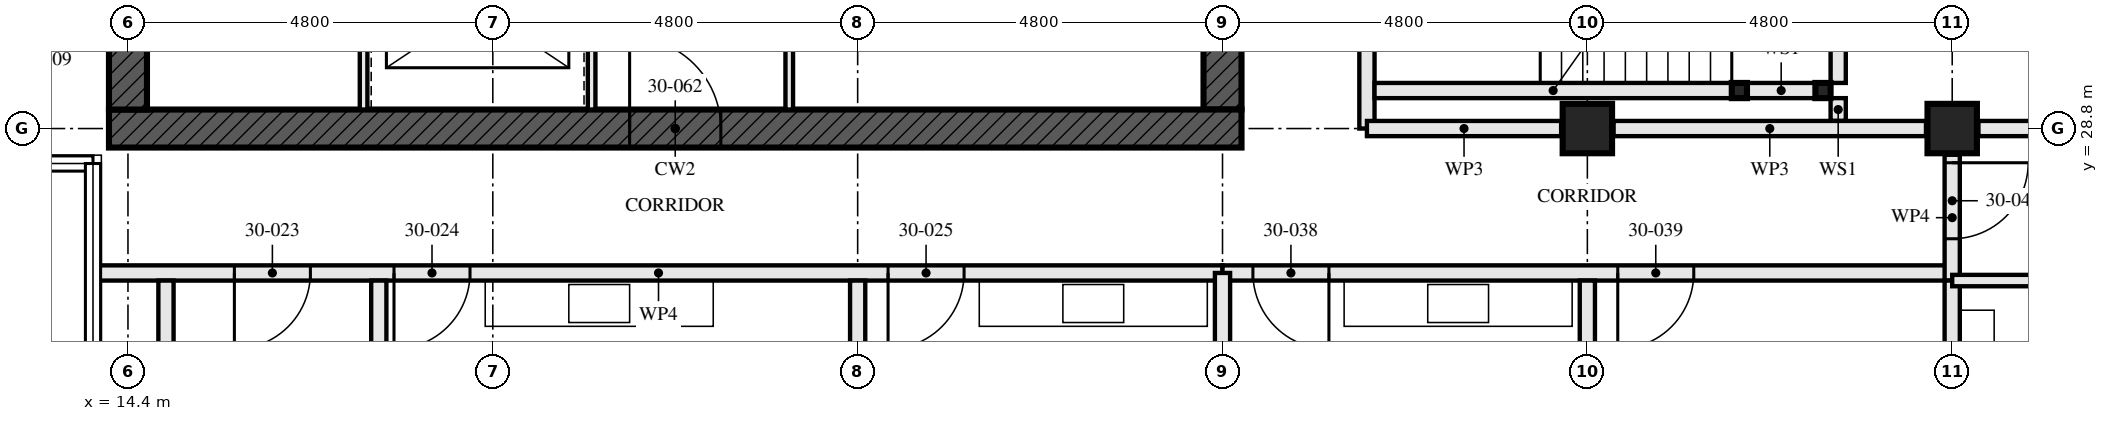
"""IFC4 building model, lengths in metres.
Left out: names, types, materials, properties, quantities, classifications, styles, units other than length and angle.
Written with IfcOpenShell. Run it as: python <this file> out.ifc"""

import sys

from ifc_helpers import new_model, si_unit, direction, frame, frame_2d, origin, origin_2d, place, context, subcontext, project, spatial, rectangle, hollow_rectangle, extrude, element, fill, save


model = new_model("IFC4")
c1 = context("Model", 3, precision=1e-05, world=origin(), true_north=direction((0.0, 1.0)))
c2 = subcontext(c1, "Body", "Model", "MODEL_VIEW")
j1 = project(units=[si_unit("LENGTHUNIT", "METRE"), si_unit("PLANEANGLEUNIT", "RADIAN")], contexts=[c1])
p1 = place(None, origin())
s1 = spatial("IfcSite", under=j1, at=p1, CompositionType="ELEMENT")
p2 = place(p1, origin())
s2 = spatial("IfcBuilding", under=s1, at=p2, CompositionType="ELEMENT")
p3 = place(p2, frame((0.0, 0.0, 112.0)))
s3 = spatial("IfcBuildingStorey", under=s2, at=p3, CompositionType="ELEMENT", Elevation=112.0)
for number, where, z_axis, x_axis in (
    (1, (33.6, 28.8, 0.0), (0.0, 0.0, 1.0), (0.0, 1.0, 0.0)),
    (2, (38.4, 28.8, 0.0), (0.0, 0.0, 1.0), (0.0, 1.0, 0.0)),
):
    element("IfcColumn", number, at=place(p3, frame(where, z_axis=z_axis, x_axis=x_axis)), inside=s3, PredefinedType="COLUMN", context=c2, shape_type="SweptSolid", body=[
        extrude(hollow_rectangle(XDim=0.65, YDim=0.65, WallThickness=0.05, at=origin_2d()), origin(), (0.0, 0.0, 1.0), 3.5),
    ])
p4 = place(p3, frame((14.15, 28.8, -0.17), z_axis=(0.0, 0.0, 1.0), x_axis=(1.0, 0.0, 0.0)))
e3 = element("IfcWall", 3, at=p4, inside=s3, PredefinedType="SHEAR", context=c2, shape_type="SweptSolid", body=[
    extrude(rectangle(XDim=14.9, YDim=0.5, at=frame_2d((7.45, 0.0))), origin(), (0.0, 0.0, 1.0), 3.5),
])
p5 = place(p4, frame((6.85, 0.0, 0.17)))
e4 = element("IfcOpeningElement", 4, at=p5, cuts=e3, PredefinedType="OPENING", context=c2, shape_type="SweptSolid", body=[
    extrude(rectangle(XDim=1.2, YDim=2.1, at=frame_2d((0.6, 1.05))), frame((0.0, 0.26, 0.0), z_axis=(0.0, -1.0, 0.0), x_axis=(1.0, 0.0, 0.0)), (0.0, 0.0, 1.0), 0.521),
])
p6 = place(p3, frame((14.4, 42.95, -0.17), z_axis=(0.0, 0.0, 1.0), x_axis=(0.0, -1.0, 0.0)))
e5 = element("IfcWall", 5, at=p6, inside=s3, PredefinedType="SHEAR", context=c2, shape_type="SweptSolid", body=[
    extrude(rectangle(XDim=13.9, YDim=0.5, at=frame_2d((6.95, 0.0))), origin(), (0.0, 0.0, 1.0), 3.5),
])
p7 = place(p6, frame((6.35, 0.0, 0.17)))
e6 = element("IfcOpeningElement", 6, at=p7, cuts=e5, PredefinedType="OPENING", context=c2, shape_type="SweptSolid", body=[
    extrude(rectangle(XDim=1.2, YDim=2.1, at=frame_2d((0.6, 1.05))), frame((0.0, 0.26, 0.0), z_axis=(0.0, -1.0, 0.0), x_axis=(1.0, 0.0, 0.0)), (0.0, 0.0, 1.0), 0.521),
])
p8 = place(p3, frame((28.8, 29.05, -0.17), z_axis=(0.0, 0.0, 1.0), x_axis=(0.0, 1.0, 0.0)))
e7 = element("IfcWall", 7, at=p8, inside=s3, PredefinedType="SHEAR", context=c2, shape_type="SweptSolid", body=[
    extrude(rectangle(XDim=13.9, YDim=0.5, at=frame_2d((6.95, 0.0))), origin(), (0.0, 0.0, 1.0), 3.5),
])
p9 = place(p8, frame((6.35, 0.0, 0.17)))
e8 = element("IfcOpeningElement", 8, at=p9, cuts=e7, PredefinedType="OPENING", context=c2, shape_type="SweptSolid", body=[
    extrude(rectangle(XDim=1.2, YDim=2.1, at=frame_2d((0.6, 1.05))), frame((0.0, 0.26, 0.0), z_axis=(0.0, -1.0, 0.0), x_axis=(1.0, 0.0, 0.0)), (0.0, 0.0, 1.0), 0.521),
])
for number, where, z_axis, x_axis in (
    (9, (36.7, 29.3, 0.0), (0.0, 0.0, 1.0), (1.0, 0.0, 0.0)),
    (10, (35.6, 29.3, 0.0), (0.0, 0.0, 1.0), (1.0, 0.0, 0.0)),
):
    element("IfcColumn", number, at=place(p3, frame(where, z_axis=z_axis, x_axis=x_axis)), inside=s3, PredefinedType="COLUMN", context=c2, shape_type="SweptSolid", body=[
        extrude(hollow_rectangle(XDim=0.2, YDim=0.2, WallThickness=0.008, at=origin_2d()), origin(), (0.0, 0.0, 1.0), 3.33),
    ])
for number, where, z_axis, x_axis in (
    (11, (14.9, 22.1, 0.0), (0.0, 0.0, 1.0), (0.0, 1.0, 0.0)),
    (12, (17.7, 22.1, 0.0), (0.0, 0.0, 1.0), (0.0, 1.0, 0.0)),
):
    element("IfcWall", number, at=place(p3, frame(where, z_axis=z_axis, x_axis=x_axis)), inside=s3, PredefinedType="SOLIDWALL", context=c2, shape_type="SweptSolid", body=[
        extrude(rectangle(XDim=4.7, YDim=0.2, at=frame_2d((2.35, 0.0))), origin(), (0.0, 0.0, 1.0), 2.99),
    ])
p10 = place(p3, frame((24.0, 14.72, 0.0), z_axis=(0.0, 0.0, 1.0), x_axis=(0.0, 1.0, 0.0)))
e13 = element("IfcWall", 13, at=p10, inside=s3, PredefinedType="PARTITIONING", context=c2, shape_type="SweptSolid", body=[
    extrude(rectangle(XDim=12.08, YDim=0.2, at=frame_2d((6.04, 0.0))), origin(), (0.0, 0.0, 1.0), 2.55),
])
p11 = place(p3, frame((13.96, 26.9, 0.0), z_axis=(0.0, 0.0, 1.0), x_axis=(1.0, 0.0, 0.0)))
e14 = element("IfcWall", 14, at=p11, inside=s3, PredefinedType="PARTITIONING", context=c2, shape_type="SweptSolid", body=[
    extrude(rectangle(XDim=14.84, YDim=0.2, at=frame_2d((7.42, 0.0))), origin(), (0.0, 0.0, 1.0), 2.32),
])
p12 = place(p11, frame((1.84, 0.0, 0.0)))
e15 = element("IfcOpeningElement", 15, at=p12, cuts=e14, PredefinedType="OPENING", context=c2, shape_type="SweptSolid", body=[
    extrude(rectangle(XDim=1.0, YDim=2.1, at=frame_2d((0.5, 1.05))), frame((0.0, 0.111, 0.0), z_axis=(0.0, -1.0, 0.0), x_axis=(1.0, 0.0, 0.0)), (0.0, 0.0, 1.0), 0.221),
])
p13 = place(p11, frame((3.94, 0.0, 0.0)))
e16 = element("IfcOpeningElement", 16, at=p13, cuts=e14, PredefinedType="OPENING", context=c2, shape_type="SweptSolid", body=[
    extrude(rectangle(XDim=1.0, YDim=2.1, at=frame_2d((0.5, 1.05))), frame((0.0, 0.111, 0.0), z_axis=(0.0, -1.0, 0.0), x_axis=(1.0, 0.0, 0.0)), (0.0, 0.0, 1.0), 0.221),
])
p14 = place(p11, frame((10.44, 0.0, 0.0)))
e17 = element("IfcOpeningElement", 17, at=p14, cuts=e14, PredefinedType="OPENING", context=c2, shape_type="SweptSolid", body=[
    extrude(rectangle(XDim=1.0, YDim=2.1, at=frame_2d((0.5, 1.05))), frame((0.0, 0.111, 0.0), z_axis=(0.0, -1.0, 0.0), x_axis=(1.0, 0.0, 0.0)), (0.0, 0.0, 1.0), 0.221),
])
p15 = place(p3, frame((33.6, 14.644, 0.0), z_axis=(0.0, 0.0, 1.0), x_axis=(0.0, 1.0, 0.0)))
e18 = element("IfcWall", 18, at=p15, inside=s3, PredefinedType="PARTITIONING", context=c2, shape_type="SweptSolid", body=[
    extrude(rectangle(XDim=12.156, YDim=0.2, at=frame_2d((6.078, 0.0))), origin(), (0.0, 0.0, 1.0), 2.55),
])
p16 = place(p3, frame((38.4, 19.52, 0.0), z_axis=(0.0, 0.0, 1.0), x_axis=(0.0, 1.0, 0.0)))
e19 = element("IfcWall", 19, at=p16, inside=s3, PredefinedType="PARTITIONING", context=c2, shape_type="SweptSolid", body=[
    extrude(rectangle(XDim=7.28, YDim=0.2, at=frame_2d((3.64, 0.0))), origin(), (0.0, 0.0, 1.0), 2.55),
])
p17 = place(p3, frame((38.4, 26.8, 0.0), z_axis=(0.0, 0.0, 1.0), x_axis=(1.0, 0.0, 0.0)))
e20 = element("IfcWall", 20, at=p17, inside=s3, PredefinedType="PARTITIONING", context=c2, shape_type="SweptSolid", body=[
    extrude(rectangle(XDim=2.8, YDim=0.15, at=frame_2d((1.4, 0.0))), origin(), (0.0, 0.0, 1.0), 3.33),
])
p18 = place(p3, frame((28.8, 26.9, 0.0), z_axis=(0.0, 0.0, 1.0), x_axis=(1.0, 0.0, 0.0)))
e21 = element("IfcWall", 21, at=p18, inside=s3, PredefinedType="PARTITIONING", context=c2, shape_type="SweptSolid", body=[
    extrude(rectangle(XDim=9.6, YDim=0.2, at=frame_2d((4.8, 0.0))), origin(), (0.0, 0.0, 1.0), 3.33),
])
p19 = place(p18, frame((0.4, 0.0, 0.0)))
e22 = element("IfcOpeningElement", 22, at=p19, cuts=e21, PredefinedType="OPENING", context=c2, shape_type="SweptSolid", body=[
    extrude(rectangle(XDim=1.0, YDim=2.1, at=frame_2d((0.5, 1.05))), frame((0.0, 0.111, 0.0), z_axis=(0.0, -1.0, 0.0), x_axis=(1.0, 0.0, 0.0)), (0.0, 0.0, 1.0), 0.221),
])
p20 = place(p18, frame((5.2, 0.0, 0.0)))
e23 = element("IfcOpeningElement", 23, at=p20, cuts=e21, PredefinedType="OPENING", context=c2, shape_type="SweptSolid", body=[
    extrude(rectangle(XDim=1.0, YDim=2.1, at=frame_2d((0.5, 1.05))), frame((0.0, 0.111, 0.0), z_axis=(0.0, -1.0, 0.0), x_axis=(1.0, 0.0, 0.0)), (0.0, 0.0, 1.0), 0.221),
])
p21 = place(p3, frame((38.4, 26.8, 0.0), z_axis=(0.0, 0.0, 1.0), x_axis=(0.0, 1.0, 0.0)))
e24 = element("IfcWall", 24, at=p21, inside=s3, PredefinedType="PARTITIONING", context=c2, shape_type="SweptSolid", body=[
    extrude(rectangle(XDim=1.655, YDim=0.2, at=frame_2d((0.828, 0.0))), origin(), (0.0, 0.0, 1.0), 3.33),
])
p22 = place(p21, frame((0.55, 0.0, 0.0)))
e25 = element("IfcOpeningElement", 25, at=p22, cuts=e24, PredefinedType="OPENING", context=c2, shape_type="SweptSolid", body=[
    extrude(rectangle(XDim=1.0, YDim=2.1, at=frame_2d((0.5, 1.05))), frame((0.0, 0.111, 0.0), z_axis=(0.0, -1.0, 0.0), x_axis=(1.0, 0.0, 0.0)), (0.0, 0.0, 1.0), 0.221),
])
p23 = place(p3, frame((36.6, 29.3, 0.0), z_axis=(0.0, 0.0, 1.0), x_axis=(-1.0, 0.0, 0.0)))
e26 = element("IfcWall", 26, at=p23, inside=s3, PredefinedType="SOLIDWALL", context=c2, shape_type="SweptSolid", body=[
    extrude(rectangle(XDim=0.9, YDim=0.2, at=frame_2d((0.45, 0.0))), origin(), (0.0, 0.0, 1.0), 2.99),
])
p24 = place(p3, frame((35.5, 29.3, 0.0), z_axis=(0.0, 0.0, 1.0), x_axis=(-1.0, 0.0, 0.0)))
e27 = element("IfcWall", 27, at=p24, inside=s3, PredefinedType="SOLIDWALL", context=c2, shape_type="SweptSolid", body=[
    extrude(rectangle(XDim=4.7, YDim=0.2, at=frame_2d((2.35, 0.0))), origin(), (0.0, 0.0, 1.0), 2.99),
])
p25 = place(p3, frame((36.9, 28.9, 0.0), z_axis=(0.0, 0.0, 1.0), x_axis=(0.0, 1.0, 0.0)))
e28 = element("IfcWall", 28, at=p25, inside=s3, PredefinedType="SOLIDWALL", context=c2, shape_type="SweptSolid", body=[
    extrude(rectangle(XDim=0.3, YDim=0.2, at=frame_2d((0.15, 0.0))), origin(), (0.0, 0.0, 1.0), 3.33),
])
p26 = place(p3, frame((36.9, 29.4, 0.0), z_axis=(0.0, 0.0, 1.0), x_axis=(0.0, 1.0, 0.0)))
e29 = element("IfcWall", 29, at=p26, inside=s3, PredefinedType="SOLIDWALL", context=c2, shape_type="SweptSolid", body=[
    extrude(rectangle(XDim=2.6, YDim=0.2, at=frame_2d((1.3, 0.0))), origin(), (0.0, 0.0, 1.0), 3.33),
])
p27 = place(p3, frame((30.7, 28.8, 0.0), z_axis=(0.0, 0.0, 1.0), x_axis=(0.0, 1.0, 0.0)))
e30 = element("IfcWall", 30, at=p27, inside=s3, PredefinedType="PARTITIONING", context=c2, shape_type="SweptSolid", body=[
    extrude(rectangle(XDim=14.84, YDim=0.2, at=frame_2d((7.42, 0.0))), origin(), (0.0, 0.0, 1.0), 2.32),
])
p28 = place(p27, frame((1.4, 0.0, 0.0)))
e31 = element("IfcOpeningElement", 31, at=p28, cuts=e30, PredefinedType="OPENING", context=c2, shape_type="SweptSolid", body=[
    extrude(rectangle(XDim=1.0, YDim=2.1, at=frame_2d((0.5, 1.05))), frame((0.0, 0.111, 0.0), z_axis=(0.0, -1.0, 0.0), x_axis=(1.0, 0.0, 0.0)), (0.0, 0.0, 1.0), 0.221),
])
p29 = place(p27, frame((4.1, 0.0, 0.0)))
e32 = element("IfcOpeningElement", 32, at=p29, cuts=e30, PredefinedType="OPENING", context=c2, shape_type="SweptSolid", body=[
    extrude(rectangle(XDim=1.0, YDim=2.1, at=frame_2d((0.5, 1.05))), frame((0.0, 0.111, 0.0), z_axis=(0.0, -1.0, 0.0), x_axis=(1.0, 0.0, 0.0)), (0.0, 0.0, 1.0), 0.221),
])
p30 = place(p27, frame((5.975, 0.0, 0.0)))
e33 = element("IfcOpeningElement", 33, at=p30, cuts=e30, PredefinedType="OPENING", context=c2, shape_type="SweptSolid", body=[
    extrude(rectangle(XDim=1.0, YDim=2.1, at=frame_2d((0.5, 1.05))), frame((0.0, 0.111, 0.0), z_axis=(0.0, -1.0, 0.0), x_axis=(1.0, 0.0, 0.0)), (0.0, 0.0, 1.0), 0.221),
])
p31 = place(p27, frame((13.0, 0.0, 0.0)))
e34 = element("IfcOpeningElement", 34, at=p31, cuts=e30, PredefinedType="OPENING", context=c2, shape_type="SweptSolid", body=[
    extrude(rectangle(XDim=1.0, YDim=2.1, at=frame_2d((0.5, 1.05))), frame((0.0, 0.111, 0.0), z_axis=(0.0, -1.0, 0.0), x_axis=(1.0, 0.0, 0.0)), (0.0, 0.0, 1.0), 0.221),
])
p32 = place(p3, frame((20.5, 29.05, 0.0), z_axis=(0.0, 0.0, 1.0), x_axis=(0.0, 1.0, 0.0)))
e35 = element("IfcWall", 35, at=p32, inside=s3, PredefinedType="SOLIDWALL", context=c2, shape_type="SweptSolid", body=[
    extrude(rectangle(XDim=5.8, YDim=0.1, at=frame_2d((2.9, 0.0))), origin(), (0.0, 0.0, 1.0), 3.33),
])
p33 = place(p32, frame((0.8, 0.0, 0.0)))
e36 = element("IfcOpeningElement", 36, at=p33, cuts=e35, PredefinedType="OPENING", context=c2, shape_type="SweptSolid", body=[
    extrude(rectangle(XDim=1.1, YDim=2.3, at=frame_2d((0.55, 1.15))), frame((0.0, 0.061, 0.0), z_axis=(0.0, -1.0, 0.0), x_axis=(1.0, 0.0, 0.0)), (0.0, 0.0, 1.0), 0.121),
])
p34 = place(p32, frame((3.775, 0.0, 0.0)))
e37 = element("IfcOpeningElement", 37, at=p34, cuts=e35, PredefinedType="OPENING", context=c2, shape_type="SweptSolid", body=[
    extrude(rectangle(XDim=1.1, YDim=2.3, at=frame_2d((0.55, 1.15))), frame((0.0, 0.061, 0.0), z_axis=(0.0, -1.0, 0.0), x_axis=(1.0, 0.0, 0.0)), (0.0, 0.0, 1.0), 0.121),
])
p35 = place(p3, frame((23.1, 29.05, 0.0), z_axis=(0.0, 0.0, 1.0), x_axis=(0.0, 1.0, 0.0)))
e38 = element("IfcWall", 38, at=p35, inside=s3, PredefinedType="SOLIDWALL", context=c2, shape_type="SweptSolid", body=[
    extrude(rectangle(XDim=5.8, YDim=0.1, at=frame_2d((2.9, 0.0))), origin(), (0.0, 0.0, 1.0), 3.33),
])
p36 = place(p35, frame((1.0, 0.0, 0.0)))
e39 = element("IfcOpeningElement", 39, at=p36, cuts=e38, PredefinedType="OPENING", context=c2, shape_type="SweptSolid", body=[
    extrude(rectangle(XDim=0.7, YDim=2.1, at=frame_2d((0.35, 1.05))), frame((0.0, 0.061, 0.0), z_axis=(0.0, -1.0, 0.0), x_axis=(1.0, 0.0, 0.0)), (0.0, 0.0, 1.0), 0.121),
])
p37 = place(p3, frame((17.5, 29.05, 0.0), z_axis=(0.0, 0.0, 1.0), x_axis=(0.0, 1.0, 0.0)))
e40 = element("IfcWall", 40, at=p37, inside=s3, PredefinedType="SOLIDWALL", context=c2, shape_type="SweptSolid", body=[
    extrude(rectangle(XDim=5.8, YDim=0.1, at=frame_2d((2.9, 0.0))), origin(), (0.0, 0.0, 1.0), 3.33),
])
p38 = place(p3, frame((28.8, 24.345, 0.0), z_axis=(0.0, 0.0, 1.0), x_axis=(0.0, 1.0, 0.0)))
e41 = element("IfcWall", 41, at=p38, inside=s3, PredefinedType="PARTITIONING", context=c2, shape_type="SweptSolid", body=[
    extrude(rectangle(XDim=2.555, YDim=0.2, at=frame_2d((1.277, 0.0))), origin(), (0.0, 0.0, 1.0), 2.32),
])
p39 = place(p3, frame((42.905, 28.8, 0.0), z_axis=(0.0, 0.0, 1.0), x_axis=(-1.0, 0.0, 0.0)))
e42 = element("IfcWall", 42, at=p39, inside=s3, PredefinedType="PARTITIONING", context=c2, shape_type="SweptSolid", body=[
    extrude(rectangle(XDim=4.16, YDim=0.2, at=frame_2d((2.08, 0.0))), origin(), (0.0, 0.0, 1.0), 2.32),
])
p40 = place(p3, frame((38.055, 28.8, 0.0), z_axis=(0.0, 0.0, 1.0), x_axis=(-1.0, 0.0, 0.0)))
e43 = element("IfcWall", 43, at=p40, inside=s3, PredefinedType="PARTITIONING", context=c2, shape_type="SweptSolid", body=[
    extrude(rectangle(XDim=4.11, YDim=0.2, at=frame_2d((2.055, 0.0))), origin(), (0.0, 0.0, 1.0), 2.32),
])
p41 = place(p3, frame((33.255, 28.8, 0.0), z_axis=(0.0, 0.0, 1.0), x_axis=(-1.0, 0.0, 0.0)))
e44 = element("IfcWall", 44, at=p41, inside=s3, PredefinedType="PARTITIONING", context=c2, shape_type="SweptSolid", body=[
    extrude(rectangle(XDim=2.555, YDim=0.2, at=frame_2d((1.277, 0.0))), origin(), (0.0, 0.0, 1.0), 2.32),
])
p42 = place(p12, frame((1.0, 0.0, 0.0), z_axis=(0.0, 0.0, 1.0), x_axis=(-1.0, 0.0, 0.0)))
e45 = element("IfcDoor", 45, at=p42, inside=s3, OperationType="SINGLE_SWING_LEFT", PredefinedType="DOOR", context=c2, shape_type="SweptSolid", body=[
    extrude(rectangle(XDim=1.0, YDim=2.1, at=frame_2d((0.5, 1.05))), frame((0.0, 0.032, 0.0), z_axis=(0.0, -1.0, 0.0), x_axis=(1.0, 0.0, 0.0)), (0.0, 0.0, 1.0), 0.064),
])
fill(e15, e45)
p43 = place(p13, frame((1.0, 0.0, 0.0), z_axis=(0.0, 0.0, 1.0), x_axis=(-1.0, 0.0, 0.0)))
e46 = element("IfcDoor", 46, at=p43, inside=s3, OperationType="SINGLE_SWING_LEFT", PredefinedType="DOOR", context=c2, shape_type="SweptSolid", body=[
    extrude(rectangle(XDim=1.0, YDim=2.1, at=frame_2d((0.5, 1.05))), frame((0.0, 0.027, 0.0), z_axis=(0.0, -1.0, 0.0), x_axis=(1.0, 0.0, 0.0)), (0.0, 0.0, 1.0), 0.054),
])
fill(e16, e46)
p44 = place(p14, frame((1.0, 0.0, 0.0), z_axis=(0.0, 0.0, 1.0), x_axis=(-1.0, 0.0, 0.0)))
e47 = element("IfcDoor", 47, at=p44, inside=s3, OperationType="SINGLE_SWING_LEFT", PredefinedType="DOOR", context=c2, shape_type="SweptSolid", body=[
    extrude(rectangle(XDim=1.0, YDim=2.1, at=frame_2d((0.5, 1.05))), frame((0.0, 0.027, 0.0), z_axis=(0.0, -1.0, 0.0), x_axis=(1.0, 0.0, 0.0)), (0.0, 0.0, 1.0), 0.054),
])
fill(e17, e47)
p45 = place(p19, frame((1.0, 0.0, 0.0), z_axis=(0.0, 0.0, 1.0), x_axis=(-1.0, 0.0, 0.0)))
e48 = element("IfcDoor", 48, at=p45, inside=s3, OperationType="SINGLE_SWING_RIGHT", PredefinedType="DOOR", context=c2, shape_type="SweptSolid", body=[
    extrude(rectangle(XDim=1.0, YDim=2.1, at=frame_2d((0.5, 1.05))), frame((0.0, 0.027, 0.0), z_axis=(0.0, -1.0, 0.0), x_axis=(1.0, 0.0, 0.0)), (0.0, 0.0, 1.0), 0.054),
])
fill(e22, e48)
p46 = place(p20, frame((1.0, 0.0, 0.0), z_axis=(0.0, 0.0, 1.0), x_axis=(-1.0, 0.0, 0.0)))
e49 = element("IfcDoor", 49, at=p46, inside=s3, OperationType="SINGLE_SWING_LEFT", PredefinedType="DOOR", context=c2, shape_type="SweptSolid", body=[
    extrude(rectangle(XDim=1.0, YDim=2.1, at=frame_2d((0.5, 1.05))), frame((0.0, 0.027, 0.0), z_axis=(0.0, -1.0, 0.0), x_axis=(1.0, 0.0, 0.0)), (0.0, 0.0, 1.0), 0.054),
])
fill(e23, e49)
p47 = place(p22, frame((1.0, 0.0, 0.0), z_axis=(0.0, 0.0, 1.0), x_axis=(-1.0, 0.0, 0.0)))
e50 = element("IfcDoor", 50, at=p47, inside=s3, OperationType="SINGLE_SWING_RIGHT", PredefinedType="DOOR", context=c2, shape_type="SweptSolid", body=[
    extrude(rectangle(XDim=1.0, YDim=2.1, at=frame_2d((0.5, 1.05))), frame((0.0, 0.027, 0.0), z_axis=(0.0, -1.0, 0.0), x_axis=(1.0, 0.0, 0.0)), (0.0, 0.0, 1.0), 0.054),
])
fill(e25, e50)
p48 = place(p5, origin())
e51 = element("IfcDoor", 51, at=p48, inside=s3, OperationType="SINGLE_SWING_LEFT", PredefinedType="DOOR", context=c2, shape_type="SweptSolid", body=[
    extrude(rectangle(XDim=1.2, YDim=2.1, at=frame_2d((0.6, 1.05))), frame((0.0, 0.027, 0.0), z_axis=(0.0, -1.0, 0.0), x_axis=(1.0, 0.0, 0.0)), (0.0, 0.0, 1.0), 0.054),
])
fill(e4, e51)
save(model, sys.argv[1])
